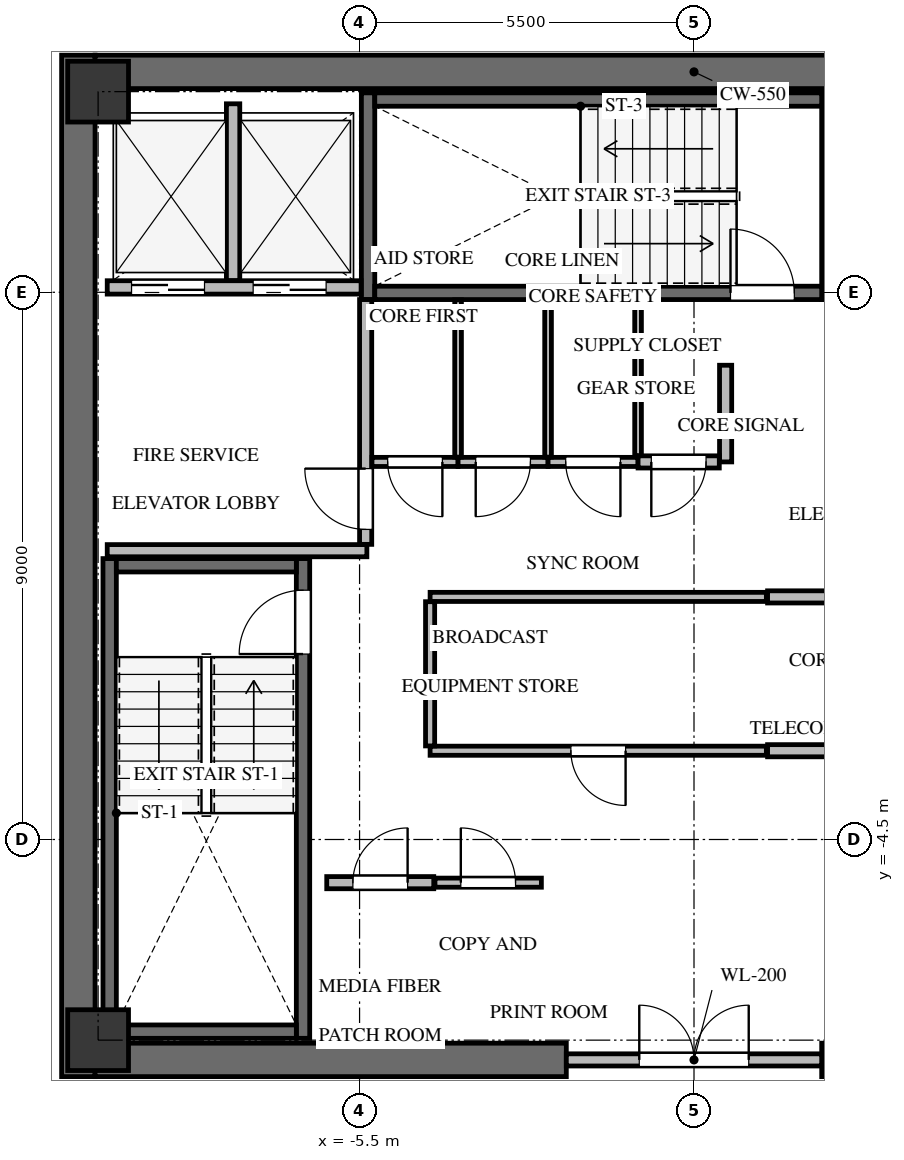
"""IFC4 building model, lengths in metres.
Left out: names, types, materials, properties, quantities, classifications, styles, units other than length and angle.
Written with IfcOpenShell. Run it as: python <this file> out.ifc"""

import sys

from ifc_helpers import new_model, si_unit, direction, frame, frame_2d, origin, origin_2d, place, context, subcontext, project, spatial, rectangle, extrude, source, transform, mapped, element, fill, save


model = new_model("IFC4")
c1 = context("Model", 3, precision=1e-05, world=origin(), true_north=direction((0.0, 1.0)))
c2 = subcontext(c1, "Body", "Model", "MODEL_VIEW")
j1 = project(units=[si_unit("LENGTHUNIT", "METRE"), si_unit("PLANEANGLEUNIT", "RADIAN")], contexts=[c1])
p1 = place(None, origin())
s1 = spatial("IfcSite", under=j1, at=p1, CompositionType="ELEMENT")
p2 = place(p1, origin())
s2 = spatial("IfcBuilding", under=s1, at=p2, CompositionType="ELEMENT")
p3 = place(p2, frame((0.0, 0.0, 248.0)))
s3 = spatial("IfcBuildingStorey", under=s2, at=p3, CompositionType="ELEMENT", Elevation=248.0)
p4 = place(p3, frame((-10.125, -8.4, 0.0), z_axis=(0.0, 0.0, 1.0), x_axis=(0.0, 1.0, 0.0)))
e1 = element("IfcWall", 1, at=p4, inside=s3, PredefinedType="SHEAR", context=c2, shape_type="SweptSolid", body=[
    extrude(rectangle(XDim=16.8, YDim=0.55, at=frame_2d((8.4, 0.0))), origin(), (0.0, 0.0, 1.0), 3.3),
])
for number, where, z_axis, x_axis in (
    (2, (-9.85, -8.125, 0.0), (0.0, 0.0, 1.0), (1.0, 0.0, 0.0)),
    (3, (2.1, -8.125, 0.0), (0.0, 0.0, 1.0), (1.0, 0.0, 0.0)),
):
    element("IfcWall", number, at=place(p3, frame(where, z_axis=z_axis, x_axis=x_axis)), inside=s3, PredefinedType="SHEAR", context=c2, shape_type="SweptSolid", body=[
        extrude(rectangle(XDim=7.75, YDim=0.55, at=frame_2d((3.875, 0.0))), origin(), (0.0, 0.0, 1.0), 3.3),
    ])
p5 = place(p3, frame((-9.85, 8.125, 0.0), z_axis=(0.0, 0.0, 1.0), x_axis=(1.0, 0.0, 0.0)))
e4 = element("IfcWall", 4, at=p5, inside=s3, PredefinedType="SHEAR", context=c2, shape_type="SweptSolid", body=[
    extrude(rectangle(XDim=19.7, YDim=0.55, at=frame_2d((9.85, 0.0))), origin(), (0.0, 0.0, 1.0), 3.3),
])
p6 = place(p3, frame((-6.43, -7.77, -0.24), z_axis=(0.0, 0.0, 1.0), x_axis=(0.0, 1.0, 0.0)))
e5 = element("IfcWall", 5, at=p6, inside=s3, PredefinedType="SHEAR", context=c2, shape_type="SweptSolid", body=[
    extrude(rectangle(XDim=7.89, YDim=0.22, at=frame_2d((3.945, 0.0))), origin(), (0.0, 0.0, 1.0), 3.3),
])
p7 = place(p6, frame((6.32, 0.0, 0.0)))
e6 = element("IfcOpeningElement", 6, at=p7, cuts=e5, PredefinedType="OPENING", context=c2, shape_type="SweptSolid", body=[
    extrude(rectangle(XDim=1.05, YDim=2.15, at=frame_2d((0.525, 1.075))), frame((0.0, 0.12, 0.0), z_axis=(0.0, -1.0, 0.0), x_axis=(1.0, 0.0, 0.0)), (0.0, 0.0, 1.0), 0.24),
])
p8 = place(p3, frame((-9.61, 0.12, -0.24), z_axis=(0.0, 0.0, 1.0), x_axis=(0.0, -1.0, 0.0)))
e7 = element("IfcWall", 7, at=p8, inside=s3, PredefinedType="SHEAR", context=c2, shape_type="SweptSolid", body=[
    extrude(rectangle(XDim=7.89, YDim=0.22, at=frame_2d((3.945, 0.0))), origin(), (0.0, 0.0, 1.0), 3.3),
])
for number, where, z_axis, x_axis in (
    (8, (-9.5, -7.66, -0.24), (0.0, 0.0, 1.0), (1.0, 0.0, 0.0)),
    (9, (-6.54, 0.01, -0.24), (0.0, 0.0, 1.0), (-1.0, 0.0, 0.0)),
):
    element("IfcWall", number, at=place(p3, frame(where, z_axis=z_axis, x_axis=x_axis)), inside=s3, PredefinedType="SHEAR", context=c2, shape_type="SweptSolid", body=[
        extrude(rectangle(XDim=2.96, YDim=0.22, at=frame_2d((1.48, 0.0))), origin(), (0.0, 0.0, 1.0), 3.3),
    ])
for number, where, z_axis, x_axis in (
    (10, (2.21, 4.38, -0.24), (0.0, 0.0, 1.0), (0.0, 1.0, 0.0)),
    (11, (-5.36, 7.78, -0.24), (0.0, 0.0, 1.0), (0.0, -1.0, 0.0)),
):
    element("IfcWall", number, at=place(p3, frame(where, z_axis=z_axis, x_axis=x_axis)), inside=s3, PredefinedType="SHEAR", context=c2, shape_type="SweptSolid", body=[
        extrude(rectangle(XDim=3.4, YDim=0.22, at=frame_2d((1.7, 0.0))), origin(), (0.0, 0.0, 1.0), 3.3),
    ])
p9 = place(p3, frame((-5.25, 4.49, -0.24), z_axis=(0.0, 0.0, 1.0), x_axis=(1.0, 0.0, 0.0)))
e12 = element("IfcWall", 12, at=p9, inside=s3, PredefinedType="SHEAR", context=c2, shape_type="SweptSolid", body=[
    extrude(rectangle(XDim=7.35, YDim=0.22, at=frame_2d((3.675, 0.0))), origin(), (0.0, 0.0, 1.0), 3.3),
])
p10 = place(p9, frame((5.85, 0.0, 0.0)))
e13 = element("IfcOpeningElement", 13, at=p10, cuts=e12, PredefinedType="OPENING", context=c2, shape_type="SweptSolid", body=[
    extrude(rectangle(XDim=1.05, YDim=2.15, at=frame_2d((0.525, 1.075))), frame((0.0, 0.12, 0.0), z_axis=(0.0, -1.0, 0.0), x_axis=(1.0, 0.0, 0.0)), (0.0, 0.0, 1.0), 0.24),
])
p11 = place(p3, frame((2.1, 7.67, -0.24), z_axis=(0.0, 0.0, 1.0), x_axis=(-1.0, 0.0, 0.0)))
e14 = element("IfcWall", 14, at=p11, inside=s3, PredefinedType="SHEAR", context=c2, shape_type="SweptSolid", body=[
    extrude(rectangle(XDim=7.35, YDim=0.22, at=frame_2d((3.675, 0.0))), origin(), (0.0, 0.0, 1.0), 3.3),
])
m1 = source(origin(), c2, "Body", "SweptSolid", [
    extrude(rectangle(XDim=1.0, YDim=1.0, at=origin_2d()), origin(), (0.0, 0.0, 1.0), 3.3),
])
for number, where, z_axis, x_axis in (
    (15, (-9.8, -7.8, -0.24), (0.0, 0.0, 1.0), (1.0, 0.0, 0.0)),
    (16, (-9.8, 7.8, -0.24), (0.0, 0.0, 1.0), (1.0, 0.0, 0.0)),
):
    element("IfcColumn", number, at=place(p3, frame(where, z_axis=z_axis, x_axis=x_axis)), inside=s3, PredefinedType="COLUMN", context=c2, shape_type="MappedRepresentation", body=[
        mapped(m1, transform((0.0, 0.0, 0.0), x_axis=(1.0, 0.0, 0.0), y_axis=(0.0, 1.0, 0.0), z_axis=(0.0, 0.0, 1.0), scale=1.0)),
    ])
p12 = place(p3, frame((-2.1, -8.125, 0.0), z_axis=(0.0, 0.0, 1.0), x_axis=(1.0, 0.0, 0.0)))
e17 = element("IfcWall", 17, at=p12, inside=s3, PredefinedType="SOLIDWALL", context=c2, shape_type="SweptSolid", body=[
    extrude(rectangle(XDim=4.2, YDim=0.2, at=frame_2d((2.1, 0.0))), origin(), (0.0, 0.0, 1.0), 3.045),
])
p13 = place(p12, frame((1.2, 0.0, 0.0)))
e18 = element("IfcOpeningElement", 18, at=p13, cuts=e17, PredefinedType="OPENING", context=c2, shape_type="SweptSolid", body=[
    extrude(rectangle(XDim=1.8, YDim=2.15, at=frame_2d((0.9, 1.075))), frame((0.0, 0.11, 0.0), z_axis=(0.0, -1.0, 0.0), x_axis=(1.0, 0.0, 0.0)), (0.0, 0.0, 1.0), 0.22),
])
p14 = place(p3, frame((-9.65, 4.58, 0.0), z_axis=(0.0, 0.0, 1.0), x_axis=(1.0, 0.0, 0.0)))
e19 = element("IfcWall", 19, at=p14, inside=s3, PredefinedType="SOLIDWALL", context=c2, shape_type="SweptSolid", body=[
    extrude(rectangle(XDim=4.175, YDim=0.22, at=frame_2d((2.087, 0.0))), origin(), (0.0, 0.0, 1.0), 3.045),
])
p15 = place(p14, frame((0.4, 0.0, 0.0)))
e20 = element("IfcOpeningElement", 20, at=p15, cuts=e19, PredefinedType="OPENING", context=c2, shape_type="SweptSolid", body=[
    extrude(rectangle(XDim=1.2, YDim=2.15, at=frame_2d((0.6, 1.075))), frame((0.0, 0.12, 0.0), z_axis=(0.0, -1.0, 0.0), x_axis=(1.0, 0.0, 0.0)), (0.0, 0.0, 1.0), 0.24),
])
p16 = place(p14, frame((2.4, 0.0, 0.0)))
e21 = element("IfcOpeningElement", 21, at=p16, cuts=e19, PredefinedType="OPENING", context=c2, shape_type="SweptSolid", body=[
    extrude(rectangle(XDim=1.2, YDim=2.15, at=frame_2d((0.6, 1.075))), frame((0.0, 0.12, 0.0), z_axis=(0.0, -1.0, 0.0), x_axis=(1.0, 0.0, 0.0)), (0.0, 0.0, 1.0), 0.24),
])
p17 = place(p3, frame((-7.58, 4.694, 0.0), z_axis=(0.0, 0.0, 1.0), x_axis=(0.0, 1.0, 0.0)))
e22 = element("IfcWall", 22, at=p17, inside=s3, PredefinedType="SOLIDWALL", context=c2, shape_type="SweptSolid", body=[
    extrude(rectangle(XDim=2.906, YDim=0.22, at=frame_2d((1.453, 0.0))), origin(), (0.0, 0.0, 1.0), 3.045),
])
p18 = place(p3, frame((-9.65, 0.25, 0.0), z_axis=(0.0, 0.0, 1.0), x_axis=(1.0, 0.0, 0.0)))
e23 = element("IfcWall", 23, at=p18, inside=s3, PredefinedType="SOLIDWALL", context=c2, shape_type="SweptSolid", body=[
    extrude(rectangle(XDim=4.27, YDim=0.2, at=frame_2d((2.135, 0.0))), origin(), (0.0, 0.0, 1.0), 3.045),
])
p19 = place(p3, frame((-5.4, 0.354, 0.0), z_axis=(0.0, 0.0, 1.0), x_axis=(0.0, 1.0, 0.0)))
e24 = element("IfcWall", 24, at=p19, inside=s3, PredefinedType="SOLIDWALL", context=c2, shape_type="SweptSolid", body=[
    extrude(rectangle(XDim=4.026, YDim=0.2, at=frame_2d((2.013, 0.0))), origin(), (0.0, 0.0, 1.0), 3.045),
])
p20 = place(p19, frame((0.246, 0.0, 0.0)))
e25 = element("IfcOpeningElement", 25, at=p20, cuts=e24, PredefinedType="OPENING", context=c2, shape_type="SweptSolid", body=[
    extrude(rectangle(XDim=1.0, YDim=2.15, at=frame_2d((0.5, 1.075))), frame((0.0, 0.11, 0.0), z_axis=(0.0, -1.0, 0.0), x_axis=(1.0, 0.0, 0.0)), (0.0, 0.0, 1.0), 0.22),
])
p21 = place(p3, frame((-6.04, -5.21, 0.0), z_axis=(0.0, 0.0, 1.0), x_axis=(1.0, 0.0, 0.0)))
e26 = element("IfcWall", 26, at=p21, inside=s3, PredefinedType="SOLIDWALL", context=c2, shape_type="SweptSolid", body=[
    extrude(rectangle(XDim=1.76, YDim=0.2, at=frame_2d((0.88, 0.0))), origin(), (0.0, 0.0, 1.0), 3.045),
])
p22 = place(p21, frame((0.43, 0.0, 0.0)))
e27 = element("IfcOpeningElement", 27, at=p22, cuts=e26, PredefinedType="OPENING", context=c2, shape_type="SweptSolid", body=[
    extrude(rectangle(XDim=0.9, YDim=2.05, at=frame_2d((0.45, 1.025))), frame((0.0, 0.11, 0.0), z_axis=(0.0, -1.0, 0.0), x_axis=(1.0, 0.0, 0.0)), (0.0, 0.0, 1.0), 0.22),
])
p23 = place(p3, frame((-4.26, -5.21, 0.0), z_axis=(0.0, 0.0, 1.0), x_axis=(1.0, 0.0, 0.0)))
e28 = element("IfcWall", 28, at=p23, inside=s3, PredefinedType="PARTITIONING", context=c2, shape_type="SweptSolid", body=[
    extrude(rectangle(XDim=1.75, YDim=0.15, at=frame_2d((0.875, 0.0))), origin(), (0.0, 0.0, 1.0), 3.045),
])
p24 = place(p23, frame((0.425, 0.0, 0.0)))
e29 = element("IfcOpeningElement", 29, at=p24, cuts=e28, PredefinedType="OPENING", context=c2, shape_type="SweptSolid", body=[
    extrude(rectangle(XDim=0.9, YDim=2.05, at=frame_2d((0.45, 1.025))), frame((0.0, 0.085, 0.0), z_axis=(0.0, -1.0, 0.0), x_axis=(1.0, 0.0, 0.0)), (0.0, 0.0, 1.0), 0.17),
])
p25 = place(p3, frame((1.19, -3.04, 0.0), z_axis=(0.0, 0.0, 1.0), x_axis=(-1.0, 0.0, 0.0)))
e30 = element("IfcWall", 30, at=p25, inside=s3, PredefinedType="PARTITIONING", context=c2, shape_type="SweptSolid", body=[
    extrude(rectangle(XDim=5.53, YDim=0.15, at=frame_2d((2.765, 0.0))), origin(), (0.0, 0.0, 1.0), 3.045),
])
p26 = place(p25, frame((2.315, 0.0, 0.0)))
e31 = element("IfcOpeningElement", 31, at=p26, cuts=e30, PredefinedType="OPENING", context=c2, shape_type="SweptSolid", body=[
    extrude(rectangle(XDim=0.9, YDim=2.05, at=frame_2d((0.45, 1.025))), frame((0.0, 0.085, 0.0), z_axis=(0.0, -1.0, 0.0), x_axis=(1.0, 0.0, 0.0)), (0.0, 0.0, 1.0), 0.17),
])
p27 = place(p3, frame((-4.34, -0.51, 0.0), z_axis=(0.0, 0.0, 1.0), x_axis=(1.0, 0.0, 0.0)))
e32 = element("IfcWall", 32, at=p27, inside=s3, PredefinedType="PARTITIONING", context=c2, shape_type="SweptSolid", body=[
    extrude(rectangle(XDim=5.53, YDim=0.15, at=frame_2d((2.765, 0.0))), origin(), (0.0, 0.0, 1.0), 3.045),
])
p28 = place(p3, frame((-4.34, -2.961, 0.0), z_axis=(0.0, 0.0, 1.0), x_axis=(0.0, 1.0, 0.0)))
e33 = element("IfcWall", 33, at=p28, inside=s3, PredefinedType="PARTITIONING", context=c2, shape_type="SweptSolid", body=[
    extrude(rectangle(XDim=2.372, YDim=0.15, at=frame_2d((1.186, 0.0))), origin(), (0.0, 0.0, 1.0), 3.045),
])
for number, where, z_axis, x_axis in (
    (34, (3.036, -3.04, 0.0), (0.0, 0.0, 1.0), (-1.0, 0.0, 0.0)),
    (35, (1.21, -0.51, 0.0), (0.0, 0.0, 1.0), (1.0, 0.0, 0.0)),
):
    element("IfcWall", number, at=place(p3, frame(where, z_axis=z_axis, x_axis=x_axis)), inside=s3, PredefinedType="SOLIDWALL", context=c2, shape_type="SweptSolid", body=[
        extrude(rectangle(XDim=1.826, YDim=0.2, at=frame_2d((0.913, 0.0))), origin(), (0.0, 0.0, 1.0), 3.045),
    ])
p29 = place(p3, frame((-3.88, 1.71, 0.0), z_axis=(0.0, 0.0, 1.0), x_axis=(-1.0, 0.0, 0.0)))
e36 = element("IfcWall", 36, at=p29, inside=s3, PredefinedType="PARTITIONING", context=c2, shape_type="SweptSolid", body=[
    extrude(rectangle(XDim=1.416, YDim=0.15, at=frame_2d((0.708, 0.0))), origin(), (0.0, 0.0, 1.0), 3.045),
])
p30 = place(p29, frame((0.258, 0.0, 0.0)))
e37 = element("IfcOpeningElement", 37, at=p30, cuts=e36, PredefinedType="OPENING", context=c2, shape_type="SweptSolid", body=[
    extrude(rectangle(XDim=0.9, YDim=2.05, at=frame_2d((0.45, 1.025))), frame((0.0, 0.085, 0.0), z_axis=(0.0, -1.0, 0.0), x_axis=(1.0, 0.0, 0.0)), (0.0, 0.0, 1.0), 0.17),
])
p31 = place(p3, frame((-2.4, 1.71, 0.0), z_axis=(0.0, 0.0, 1.0), x_axis=(-1.0, 0.0, 0.0)))
e38 = element("IfcWall", 38, at=p31, inside=s3, PredefinedType="PARTITIONING", context=c2, shape_type="SweptSolid", body=[
    extrude(rectangle(XDim=1.48, YDim=0.15, at=frame_2d((0.74, 0.0))), origin(), (0.0, 0.0, 1.0), 3.045),
])
p32 = place(p31, frame((0.29, 0.0, 0.0)))
e39 = element("IfcOpeningElement", 39, at=p32, cuts=e38, PredefinedType="OPENING", context=c2, shape_type="SweptSolid", body=[
    extrude(rectangle(XDim=0.9, YDim=2.05, at=frame_2d((0.45, 1.025))), frame((0.0, 0.085, 0.0), z_axis=(0.0, -1.0, 0.0), x_axis=(1.0, 0.0, 0.0)), (0.0, 0.0, 1.0), 0.17),
])
p33 = place(p3, frame((-0.92, 1.71, 0.0), z_axis=(0.0, 0.0, 1.0), x_axis=(-1.0, 0.0, 0.0)))
e40 = element("IfcWall", 40, at=p33, inside=s3, PredefinedType="PARTITIONING", context=c2, shape_type="SweptSolid", body=[
    extrude(rectangle(XDim=1.48, YDim=0.15, at=frame_2d((0.74, 0.0))), origin(), (0.0, 0.0, 1.0), 3.045),
])
p34 = place(p33, frame((0.29, 0.0, 0.0)))
e41 = element("IfcOpeningElement", 41, at=p34, cuts=e40, PredefinedType="OPENING", context=c2, shape_type="SweptSolid", body=[
    extrude(rectangle(XDim=0.9, YDim=2.05, at=frame_2d((0.45, 1.025))), frame((0.0, 0.085, 0.0), z_axis=(0.0, -1.0, 0.0), x_axis=(1.0, 0.0, 0.0)), (0.0, 0.0, 1.0), 0.17),
])
p35 = place(p3, frame((0.52, 3.3, 0.0), z_axis=(0.0, 0.0, 1.0), x_axis=(0.0, -1.0, 0.0)))
e42 = element("IfcWall", 42, at=p35, inside=s3, PredefinedType="SOLIDWALL", context=c2, shape_type="SweptSolid", body=[
    extrude(rectangle(XDim=1.59, YDim=0.2, at=frame_2d((0.795, 0.0))), origin(), (0.0, 0.0, 1.0), 3.045),
])
p36 = place(p3, frame((0.416, 1.71, 0.0), z_axis=(0.0, 0.0, 1.0), x_axis=(-1.0, 0.0, 0.0)))
e43 = element("IfcWall", 43, at=p36, inside=s3, PredefinedType="SOLIDWALL", context=c2, shape_type="SweptSolid", body=[
    extrude(rectangle(XDim=1.336, YDim=0.2, at=frame_2d((0.668, 0.0))), origin(), (0.0, 0.0, 1.0), 3.045),
])
p37 = place(p36, frame((0.218, 0.0, 0.0)))
e44 = element("IfcOpeningElement", 44, at=p37, cuts=e43, PredefinedType="OPENING", context=c2, shape_type="SweptSolid", body=[
    extrude(rectangle(XDim=0.9, YDim=2.05, at=frame_2d((0.45, 1.025))), frame((0.0, 0.11, 0.0), z_axis=(0.0, -1.0, 0.0), x_axis=(1.0, 0.0, 0.0)), (0.0, 0.0, 1.0), 0.22),
])
for number, where, z_axis, x_axis in (
    (45, (-3.88, 4.375, 0.0), (0.0, 0.0, 1.0), (0.0, -1.0, 0.0)),
    (46, (-2.4, 4.375, 0.0), (0.0, 0.0, 1.0), (0.0, -1.0, 0.0)),
):
    element("IfcWall", number, at=place(p3, frame(where, z_axis=z_axis, x_axis=x_axis)), inside=s3, PredefinedType="MOVABLE", context=c2, shape_type="SweptSolid", body=[
        extrude(rectangle(XDim=2.586, YDim=0.11, at=frame_2d((1.293, 0.0))), origin(), (0.0, 0.0, 1.0), 3.045),
    ])
p38 = place(p3, frame((-0.92, 4.375, 0.0), z_axis=(0.0, 0.0, 1.0), x_axis=(0.0, -1.0, 0.0)))
e47 = element("IfcWall", 47, at=p38, inside=s3, PredefinedType="MOVABLE", context=c2, shape_type="SweptSolid", body=[
    extrude(rectangle(XDim=2.561, YDim=0.11, at=frame_2d((1.281, 0.0))), origin(), (0.0, 0.0, 1.0), 3.045),
])
m2 = source(origin(), c2, "Body", "SweptSolid", [
    extrude(rectangle(XDim=1.05, YDim=2.15, at=frame_2d((0.525, 1.075))), frame((0.0, 0.025, 0.0), z_axis=(0.0, -1.0, 0.0), x_axis=(1.0, 0.0, 0.0)), (0.0, 0.0, 1.0), 0.05),
])
p39 = place(p7, origin())
e48 = element("IfcDoor", 48, at=p39, inside=s3, OperationType="SINGLE_SWING_LEFT", PredefinedType="DOOR", context=c2, shape_type="MappedRepresentation", body=[
    mapped(m2, transform((0.0, 0.0, 0.0), x_axis=(1.0, 0.0, 0.0), y_axis=(0.0, 1.0, 0.0), z_axis=(0.0, 0.0, 1.0), scale=1.0)),
])
fill(e6, e48)
p40 = place(p10, origin())
e49 = element("IfcDoor", 49, at=p40, inside=s3, OperationType="SINGLE_SWING_LEFT", PredefinedType="DOOR", context=c2, shape_type="MappedRepresentation", body=[
    mapped(m2, transform((0.0, 0.0, 0.0), x_axis=(1.0, 0.0, 0.0), y_axis=(0.0, 1.0, 0.0), z_axis=(0.0, 0.0, 1.0), scale=1.0)),
])
fill(e13, e49)
m3 = source(origin(), c2, "Body", "SweptSolid", [
    extrude(rectangle(XDim=1.8, YDim=2.15, at=frame_2d((0.9, 1.075))), frame((0.0, 0.025, 0.0), z_axis=(0.0, -1.0, 0.0), x_axis=(1.0, 0.0, 0.0)), (0.0, 0.0, 1.0), 0.05),
])
p41 = place(p13, origin())
e50 = element("IfcDoor", 50, at=p41, inside=s3, OperationType="DOUBLE_DOOR_SINGLE_SWING", PredefinedType="DOOR", context=c2, shape_type="MappedRepresentation", body=[
    mapped(m3, transform((0.0, 0.0, 0.0), x_axis=(1.0, 0.0, 0.0), y_axis=(0.0, 1.0, 0.0), z_axis=(0.0, 0.0, 1.0), scale=1.0)),
])
fill(e18, e50)
m4 = source(origin(), c2, "Body", "SweptSolid", [
    extrude(rectangle(XDim=1.2, YDim=2.15, at=frame_2d((0.6, 1.075))), frame((0.0, 0.025, 0.0), z_axis=(0.0, -1.0, 0.0), x_axis=(1.0, 0.0, 0.0)), (0.0, 0.0, 1.0), 0.05),
])
p42 = place(p15, origin())
e51 = element("IfcDoor", 51, at=p42, inside=s3, OperationType="DOUBLE_DOOR_SLIDING", PredefinedType="DOOR", context=c2, shape_type="MappedRepresentation", body=[
    mapped(m4, transform((0.0, 0.0, 0.0), x_axis=(1.0, 0.0, 0.0), y_axis=(0.0, 1.0, 0.0), z_axis=(0.0, 0.0, 1.0), scale=1.0)),
])
fill(e20, e51)
p43 = place(p16, origin())
e52 = element("IfcDoor", 52, at=p43, inside=s3, OperationType="DOUBLE_DOOR_SLIDING", PredefinedType="DOOR", context=c2, shape_type="MappedRepresentation", body=[
    mapped(m4, transform((0.0, 0.0, 0.0), x_axis=(1.0, 0.0, 0.0), y_axis=(0.0, 1.0, 0.0), z_axis=(0.0, 0.0, 1.0), scale=1.0)),
])
fill(e21, e52)
m5 = source(origin(), c2, "Body", "SweptSolid", [
    extrude(rectangle(XDim=1.0, YDim=2.15, at=frame_2d((0.5, 1.075))), frame((0.0, 0.025, 0.0), z_axis=(0.0, -1.0, 0.0), x_axis=(1.0, 0.0, 0.0)), (0.0, 0.0, 1.0), 0.05),
])
p44 = place(p20, origin())
e53 = element("IfcDoor", 53, at=p44, inside=s3, OperationType="SINGLE_SWING_RIGHT", PredefinedType="DOOR", context=c2, shape_type="MappedRepresentation", body=[
    mapped(m5, transform((0.0, 0.0, 0.0), x_axis=(1.0, 0.0, 0.0), y_axis=(0.0, 1.0, 0.0), z_axis=(0.0, 0.0, 1.0), scale=1.0)),
])
fill(e25, e53)
m6 = source(origin(), c2, "Body", "SweptSolid", [
    extrude(rectangle(XDim=0.9, YDim=2.05, at=frame_2d((0.45, 1.025))), frame((0.0, 0.025, 0.0), z_axis=(0.0, -1.0, 0.0), x_axis=(1.0, 0.0, 0.0)), (0.0, 0.0, 1.0), 0.05),
])
p45 = place(p22, origin())
e54 = element("IfcDoor", 54, at=p45, inside=s3, OperationType="SINGLE_SWING_RIGHT", PredefinedType="DOOR", context=c2, shape_type="MappedRepresentation", body=[
    mapped(m6, transform((0.0, 0.0, 0.0), x_axis=(1.0, 0.0, 0.0), y_axis=(0.0, 1.0, 0.0), z_axis=(0.0, 0.0, 1.0), scale=1.0)),
])
fill(e27, e54)
m7 = source(origin(), c2, "Body", "SweptSolid", [
    extrude(rectangle(XDim=0.9, YDim=2.05, at=frame_2d((0.45, 1.025))), frame((0.0, 0.025, 0.0), z_axis=(0.0, -1.0, 0.0), x_axis=(1.0, 0.0, 0.0)), (0.0, 0.0, 1.0), 0.05),
])
p46 = place(p24, origin())
e55 = element("IfcDoor", 55, at=p46, inside=s3, OperationType="SINGLE_SWING_LEFT", PredefinedType="DOOR", context=c2, shape_type="MappedRepresentation", body=[
    mapped(m7, transform((0.0, 0.0, 0.0), x_axis=(1.0, 0.0, 0.0), y_axis=(0.0, 1.0, 0.0), z_axis=(0.0, 0.0, 1.0), scale=1.0)),
])
fill(e29, e55)
p47 = place(p26, origin())
e56 = element("IfcDoor", 56, at=p47, inside=s3, OperationType="SINGLE_SWING_LEFT", PredefinedType="DOOR", context=c2, shape_type="MappedRepresentation", body=[
    mapped(m7, transform((0.0, 0.0, 0.0), x_axis=(1.0, 0.0, 0.0), y_axis=(0.0, 1.0, 0.0), z_axis=(0.0, 0.0, 1.0), scale=1.0)),
])
fill(e31, e56)
p48 = place(p30, origin())
e57 = element("IfcDoor", 57, at=p48, inside=s3, OperationType="SINGLE_SWING_LEFT", PredefinedType="DOOR", context=c2, shape_type="MappedRepresentation", body=[
    mapped(m7, transform((0.0, 0.0, 0.0), x_axis=(1.0, 0.0, 0.0), y_axis=(0.0, 1.0, 0.0), z_axis=(0.0, 0.0, 1.0), scale=1.0)),
])
fill(e37, e57)
p49 = place(p32, origin())
e58 = element("IfcDoor", 58, at=p49, inside=s3, OperationType="SINGLE_SWING_RIGHT", PredefinedType="DOOR", context=c2, shape_type="MappedRepresentation", body=[
    mapped(m6, transform((0.0, 0.0, 0.0), x_axis=(1.0, 0.0, 0.0), y_axis=(0.0, 1.0, 0.0), z_axis=(0.0, 0.0, 1.0), scale=1.0)),
])
fill(e39, e58)
p50 = place(p34, origin())
e59 = element("IfcDoor", 59, at=p50, inside=s3, OperationType="SINGLE_SWING_LEFT", PredefinedType="DOOR", context=c2, shape_type="MappedRepresentation", body=[
    mapped(m7, transform((0.0, 0.0, 0.0), x_axis=(1.0, 0.0, 0.0), y_axis=(0.0, 1.0, 0.0), z_axis=(0.0, 0.0, 1.0), scale=1.0)),
])
fill(e41, e59)
p51 = place(p37, origin())
e60 = element("IfcDoor", 60, at=p51, inside=s3, OperationType="SINGLE_SWING_RIGHT", PredefinedType="DOOR", context=c2, shape_type="MappedRepresentation", body=[
    mapped(m6, transform((0.0, 0.0, 0.0), x_axis=(1.0, 0.0, 0.0), y_axis=(0.0, 1.0, 0.0), z_axis=(0.0, 0.0, 1.0), scale=1.0)),
])
fill(e44, e60)
save(model, sys.argv[1])
